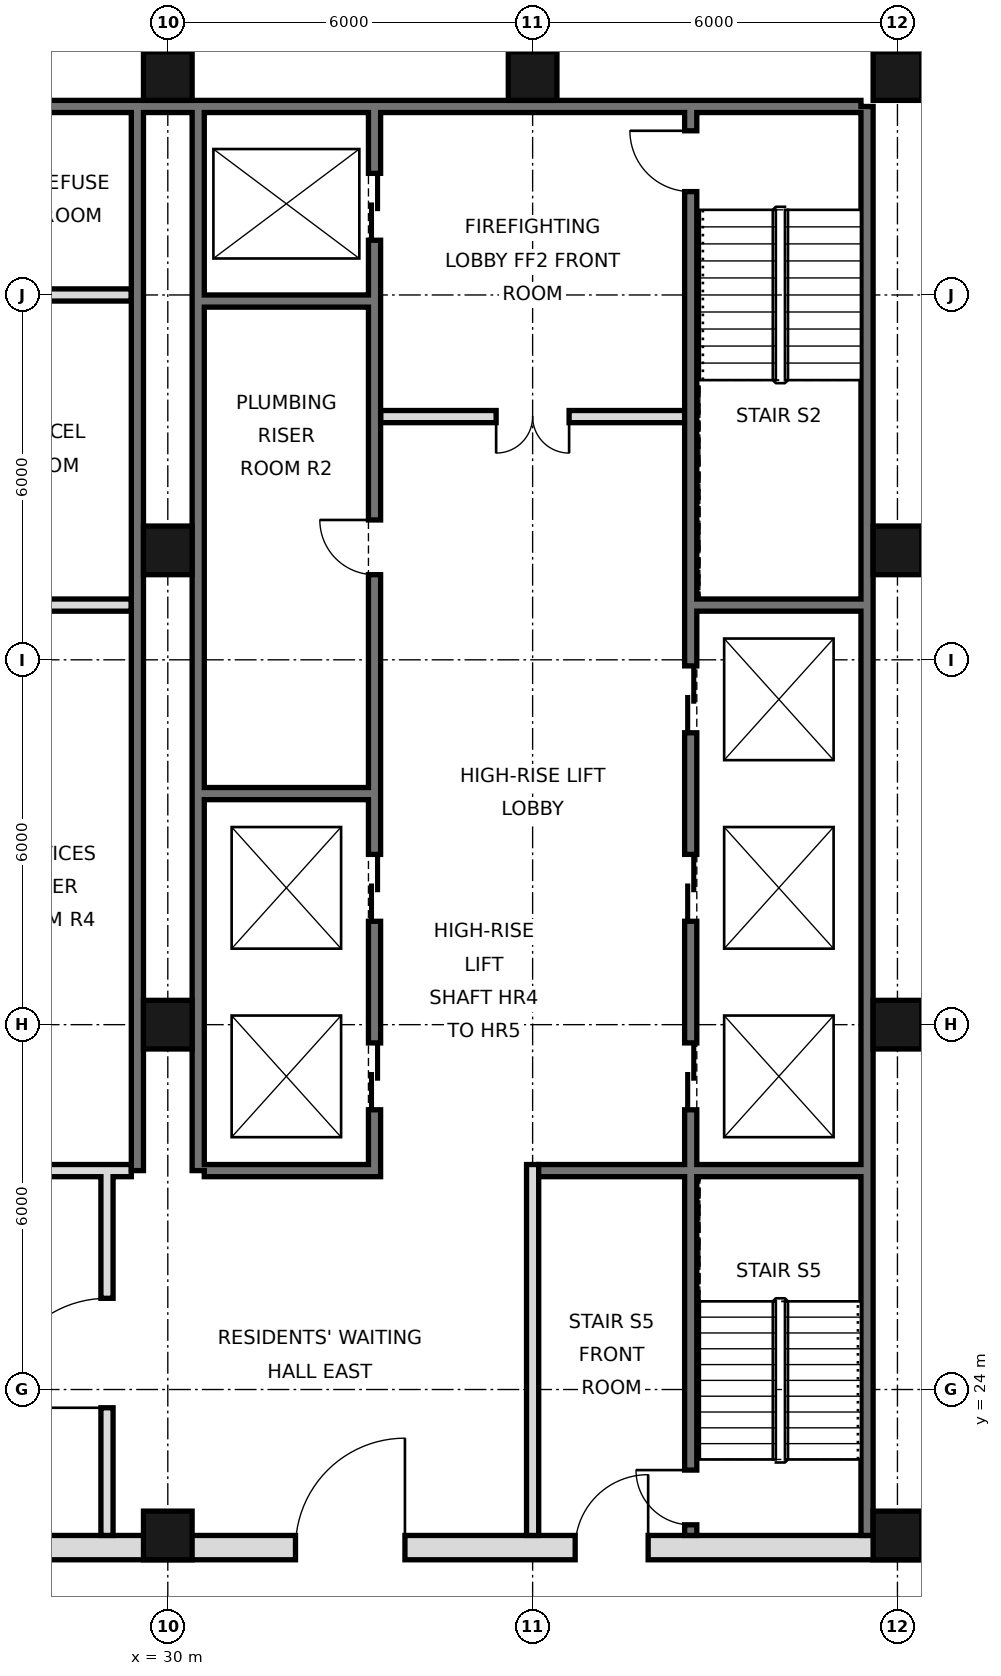
"""IFC4 building model, lengths in metres.
Left out: names, types, materials, properties, quantities, classifications, styles, units other than length and angle.
Written with IfcOpenShell. Run it as: python <this file> out.ifc"""

import sys

from ifc_helpers import new_model, si_unit, direction, frame, frame_2d, origin, origin_2d, place, context, subcontext, project, spatial, rectangle, hollow_rectangle, extrude, element, fill, save


model = new_model("IFC4")
c1 = context("Model", 3, precision=1e-05, world=origin(), true_north=direction((0.0, 1.0)))
c2 = subcontext(c1, "Body", "Model", "MODEL_VIEW")
j1 = project(units=[si_unit("LENGTHUNIT", "METRE"), si_unit("PLANEANGLEUNIT", "RADIAN")], contexts=[c1])
p1 = place(None, origin())
s1 = spatial("IfcSite", under=j1, at=p1, CompositionType="ELEMENT")
p2 = place(p1, origin())
s2 = spatial("IfcBuilding", under=s1, at=p2, CompositionType="ELEMENT")
p3 = place(p2, frame((0.0, 0.0, 305.2)))
s3 = spatial("IfcBuildingStorey", under=s2, at=p3, CompositionType="ELEMENT", Elevation=305.2)
for number, where, z_axis, x_axis in (
    (1, (30.0, 21.6, 0.0), (0.0, 0.0, 1.0), (1.0, 0.0, 0.0)),
    (2, (30.0, 30.0, 0.0), (0.0, 0.0, 1.0), (1.0, 0.0, 0.0)),
    (3, (30.0, 37.8, 0.0), (0.0, 0.0, 1.0), (1.0, 0.0, 0.0)),
    (4, (30.0, 45.6, 0.0), (0.0, 0.0, 1.0), (1.0, 0.0, 0.0)),
    (5, (36.0, 45.6, 0.0), (0.0, 0.0, 1.0), (1.0, 0.0, 0.0)),
    (6, (42.0, 21.6, 0.0), (0.0, 0.0, 1.0), (1.0, 0.0, 0.0)),
    (7, (42.0, 30.0, 0.0), (0.0, 0.0, 1.0), (1.0, 0.0, 0.0)),
    (8, (42.0, 37.8, 0.0), (0.0, 0.0, 1.0), (1.0, 0.0, 0.0)),
    (9, (42.0, 45.6, 0.0), (0.0, 0.0, 1.0), (1.0, 0.0, 0.0)),
):
    element("IfcColumn", number, at=place(p3, frame(where, z_axis=z_axis, x_axis=x_axis)), inside=s3, PredefinedType="COLUMN", context=c2, shape_type="SweptSolid", body=[
        extrude(hollow_rectangle(XDim=0.8, YDim=0.8, WallThickness=0.025, at=origin_2d()), origin(), (0.0, 0.0, 1.0), 3.6),
    ])
p4 = place(p3, frame((41.5, 21.6, 0.0), z_axis=(0.0, 0.0, 1.0), x_axis=(0.0, 1.0, 0.0)))
e10 = element("IfcWall", 10, at=p4, inside=s3, PredefinedType="SOLIDWALL", context=c2, shape_type="SweptSolid", body=[
    extrude(rectangle(XDim=23.5, YDim=0.2, at=frame_2d((11.75, 0.0))), origin(), (0.0, 0.0, 1.0), 3.42),
])
p5 = place(p3, frame((6.6, 45.1, 0.0), z_axis=(0.0, 0.0, 1.0), x_axis=(1.0, 0.0, 0.0)))
e11 = element("IfcWall", 11, at=p5, inside=s3, PredefinedType="SOLIDWALL", context=c2, shape_type="SweptSolid", body=[
    extrude(rectangle(XDim=34.8, YDim=0.2, at=frame_2d((17.4, 0.0))), origin(), (0.0, 0.0, 1.0), 3.42),
])
for number, where, z_axis, x_axis in (
    (12, (29.5, 27.6, 0.0), (0.0, 0.0, 1.0), (0.0, 1.0, 0.0)),
    (13, (30.5, 27.6, 0.0), (0.0, 0.0, 1.0), (0.0, 1.0, 0.0)),
):
    element("IfcWall", number, at=place(p3, frame(where, z_axis=z_axis, x_axis=x_axis)), inside=s3, PredefinedType="SOLIDWALL", context=c2, shape_type="SweptSolid", body=[
        extrude(rectangle(XDim=17.5, YDim=0.2, at=frame_2d((8.75, 0.0))), origin(), (0.0, 0.0, 1.0), 3.42),
    ])
p6 = place(p3, frame((5.6, 21.4, 0.0), z_axis=(0.0, 0.0, 1.0), x_axis=(1.0, 0.0, 0.0)))
e14 = element("IfcWall", 14, at=p6, inside=s3, PredefinedType="SOLIDWALL", context=c2, shape_type="SweptSolid", body=[
    extrude(rectangle(XDim=36.8, YDim=0.4, at=frame_2d((18.4, 0.0))), origin(), (0.0, 0.0, 1.0), 3.42),
])
p7 = place(p6, frame((8.5, 0.0, 0.0)))
e15 = element("IfcOpeningElement", 15, at=p7, cuts=e14, PredefinedType="OPENING", context=c2, shape_type="SweptSolid", body=[
    extrude(rectangle(XDim=1.8, YDim=2.1, at=frame_2d((0.9, 1.05))), frame((0.0, 0.21, 0.0), z_axis=(0.0, -1.0, 0.0), x_axis=(1.0, 0.0, 0.0)), (0.0, 0.0, 1.0), 0.42),
])
p8 = place(p6, frame((17.5, 0.0, 0.0)))
e16 = element("IfcOpeningElement", 16, at=p8, cuts=e14, PredefinedType="OPENING", context=c2, shape_type="SweptSolid", body=[
    extrude(rectangle(XDim=1.8, YDim=2.1, at=frame_2d((0.9, 1.05))), frame((0.0, 0.21, 0.0), z_axis=(0.0, -1.0, 0.0), x_axis=(1.0, 0.0, 0.0)), (0.0, 0.0, 1.0), 0.42),
])
p9 = place(p6, frame((26.5, 0.0, 0.0)))
e17 = element("IfcOpeningElement", 17, at=p9, cuts=e14, PredefinedType="OPENING", context=c2, shape_type="SweptSolid", body=[
    extrude(rectangle(XDim=1.8, YDim=2.1, at=frame_2d((0.9, 1.05))), frame((0.0, 0.21, 0.0), z_axis=(0.0, -1.0, 0.0), x_axis=(1.0, 0.0, 0.0)), (0.0, 0.0, 1.0), 0.42),
])
p10 = place(p6, frame((4.5, 0.0, 0.0)))
e18 = element("IfcOpeningElement", 18, at=p10, cuts=e14, PredefinedType="OPENING", context=c2, shape_type="SweptSolid", body=[
    extrude(rectangle(XDim=1.2, YDim=2.1, at=frame_2d((0.6, 1.05))), frame((0.0, 0.21, 0.0), z_axis=(0.0, -1.0, 0.0), x_axis=(1.0, 0.0, 0.0)), (0.0, 0.0, 1.0), 0.42),
])
p11 = place(p6, frame((31.1, 0.0, 0.0)))
e19 = element("IfcOpeningElement", 19, at=p11, cuts=e14, PredefinedType="OPENING", context=c2, shape_type="SweptSolid", body=[
    extrude(rectangle(XDim=1.2, YDim=2.1, at=frame_2d((0.6, 1.05))), frame((0.0, 0.21, 0.0), z_axis=(0.0, -1.0, 0.0), x_axis=(1.0, 0.0, 0.0)), (0.0, 0.0, 1.0), 0.42),
])
p12 = place(p3, frame((29.0, 21.6, 0.0), z_axis=(0.0, 0.0, 1.0), x_axis=(0.0, 1.0, 0.0)))
e20 = element("IfcWall", 20, at=p12, inside=s3, PredefinedType="PARTITIONING", context=c2, shape_type="SweptSolid", body=[
    extrude(rectangle(XDim=6.0, YDim=0.2, at=frame_2d((3.0, 0.0))), origin(), (0.0, 0.0, 1.0), 3.42),
])
p13 = place(p12, frame((2.1, 0.0, 0.0)))
e21 = element("IfcOpeningElement", 21, at=p13, cuts=e20, PredefinedType="OPENING", context=c2, shape_type="SweptSolid", body=[
    extrude(rectangle(XDim=1.8, YDim=2.1, at=frame_2d((0.9, 1.05))), frame((0.0, 0.11, 0.0), z_axis=(0.0, -1.0, 0.0), x_axis=(1.0, 0.0, 0.0)), (0.0, 0.0, 1.0), 0.22),
])
p14 = place(p3, frame((33.4, 27.5, 0.0), z_axis=(0.0, 0.0, 1.0), x_axis=(0.0, 1.0, 0.0)))
e22 = element("IfcWall", 22, at=p14, inside=s3, PredefinedType="SOLIDWALL", context=c2, shape_type="SweptSolid", body=[
    extrude(rectangle(XDim=17.5, YDim=0.2, at=frame_2d((8.75, 0.0))), origin(), (0.0, 0.0, 1.0), 3.42),
])
p15 = place(p14, frame((1.1, 0.0, 0.0)))
e23 = element("IfcOpeningElement", 23, at=p15, cuts=e22, PredefinedType="OPENING", context=c2, shape_type="SweptSolid", body=[
    extrude(rectangle(XDim=1.1, YDim=2.1, at=frame_2d((0.55, 1.05))), frame((0.0, 0.11, 0.0), z_axis=(0.0, -1.0, 0.0), x_axis=(1.0, 0.0, 0.0)), (0.0, 0.0, 1.0), 0.22),
])
p16 = place(p14, frame((4.2, 0.0, 0.0)))
e24 = element("IfcOpeningElement", 24, at=p16, cuts=e22, PredefinedType="OPENING", context=c2, shape_type="SweptSolid", body=[
    extrude(rectangle(XDim=1.1, YDim=2.1, at=frame_2d((0.55, 1.05))), frame((0.0, 0.11, 0.0), z_axis=(0.0, -1.0, 0.0), x_axis=(1.0, 0.0, 0.0)), (0.0, 0.0, 1.0), 0.22),
])
p17 = place(p14, frame((15.4, 0.0, 0.0)))
e25 = element("IfcOpeningElement", 25, at=p17, cuts=e22, PredefinedType="OPENING", context=c2, shape_type="SweptSolid", body=[
    extrude(rectangle(XDim=1.1, YDim=2.1, at=frame_2d((0.55, 1.05))), frame((0.0, 0.11, 0.0), z_axis=(0.0, -1.0, 0.0), x_axis=(1.0, 0.0, 0.0)), (0.0, 0.0, 1.0), 0.22),
])
p18 = place(p14, frame((9.9, 0.0, 0.0)))
e26 = element("IfcOpeningElement", 26, at=p18, cuts=e22, PredefinedType="OPENING", context=c2, shape_type="SweptSolid", body=[
    extrude(rectangle(XDim=0.9, YDim=2.1, at=frame_2d((0.45, 1.05))), frame((0.0, 0.11, 0.0), z_axis=(0.0, -1.0, 0.0), x_axis=(1.0, 0.0, 0.0)), (0.0, 0.0, 1.0), 0.22),
])
p19 = place(p3, frame((36.0, 21.6, 0.0), z_axis=(0.0, 0.0, 1.0), x_axis=(0.0, 1.0, 0.0)))
e27 = element("IfcWall", 27, at=p19, inside=s3, PredefinedType="PARTITIONING", context=c2, shape_type="SweptSolid", body=[
    extrude(rectangle(XDim=6.1, YDim=0.2, at=frame_2d((3.05, 0.0))), origin(), (0.0, 0.0, 1.0), 3.42),
])
p20 = place(p3, frame((38.6, 21.6, 0.0), z_axis=(0.0, 0.0, 1.0), x_axis=(0.0, 1.0, 0.0)))
e28 = element("IfcWall", 28, at=p20, inside=s3, PredefinedType="SOLIDWALL", context=c2, shape_type="SweptSolid", body=[
    extrude(rectangle(XDim=23.4, YDim=0.2, at=frame_2d((11.7, 0.0))), origin(), (0.0, 0.0, 1.0), 3.42),
])
p21 = place(p20, frame((7.0, 0.0, 0.0)))
e29 = element("IfcOpeningElement", 29, at=p21, cuts=e28, PredefinedType="OPENING", context=c2, shape_type="SweptSolid", body=[
    extrude(rectangle(XDim=1.1, YDim=2.1, at=frame_2d((0.55, 1.05))), frame((0.0, 0.11, 0.0), z_axis=(0.0, -1.0, 0.0), x_axis=(1.0, 0.0, 0.0)), (0.0, 0.0, 1.0), 0.22),
])
p22 = place(p20, frame((10.1, 0.0, 0.0)))
e30 = element("IfcOpeningElement", 30, at=p22, cuts=e28, PredefinedType="OPENING", context=c2, shape_type="SweptSolid", body=[
    extrude(rectangle(XDim=1.1, YDim=2.1, at=frame_2d((0.55, 1.05))), frame((0.0, 0.11, 0.0), z_axis=(0.0, -1.0, 0.0), x_axis=(1.0, 0.0, 0.0)), (0.0, 0.0, 1.0), 0.22),
])
p23 = place(p20, frame((13.2, 0.0, 0.0)))
e31 = element("IfcOpeningElement", 31, at=p23, cuts=e28, PredefinedType="OPENING", context=c2, shape_type="SweptSolid", body=[
    extrude(rectangle(XDim=1.1, YDim=2.1, at=frame_2d((0.55, 1.05))), frame((0.0, 0.11, 0.0), z_axis=(0.0, -1.0, 0.0), x_axis=(1.0, 0.0, 0.0)), (0.0, 0.0, 1.0), 0.22),
])
p24 = place(p20, frame((22.1, 0.0, 0.0)))
e32 = element("IfcOpeningElement", 32, at=p24, cuts=e28, PredefinedType="OPENING", context=c2, shape_type="SweptSolid", body=[
    extrude(rectangle(XDim=1.0, YDim=2.1, at=frame_2d((0.5, 1.05))), frame((0.0, 0.11, 0.0), z_axis=(0.0, -1.0, 0.0), x_axis=(1.0, 0.0, 0.0)), (0.0, 0.0, 1.0), 0.22),
])
p25 = place(p20, frame((0.175, 0.0, 0.0)))
e33 = element("IfcOpeningElement", 33, at=p25, cuts=e28, PredefinedType="OPENING", context=c2, shape_type="SweptSolid", body=[
    extrude(rectangle(XDim=0.9, YDim=2.1, at=frame_2d((0.45, 1.05))), frame((0.0, 0.11, 0.0), z_axis=(0.0, -1.0, 0.0), x_axis=(1.0, 0.0, 0.0)), (0.0, 0.0, 1.0), 0.22),
])
for number, where, z_axis, x_axis in (
    (34, (26.7, 27.6, 0.0), (0.0, 0.0, 1.0), (1.0, 0.0, 0.0)),
    (35, (30.6, 27.6, 0.0), (0.0, 0.0, 1.0), (1.0, 0.0, 0.0)),
):
    element("IfcWall", number, at=place(p3, frame(where, z_axis=z_axis, x_axis=x_axis)), inside=s3, PredefinedType="SOLIDWALL", context=c2, shape_type="SweptSolid", body=[
        extrude(rectangle(XDim=2.7, YDim=0.2, at=frame_2d((1.35, 0.0))), origin(), (0.0, 0.0, 1.0), 3.42),
    ])
p26 = place(p3, frame((36.1, 27.6, 0.0), z_axis=(0.0, 0.0, 1.0), x_axis=(1.0, 0.0, 0.0)))
e36 = element("IfcWall", 36, at=p26, inside=s3, PredefinedType="SOLIDWALL", context=c2, shape_type="SweptSolid", body=[
    extrude(rectangle(XDim=5.3, YDim=0.2, at=frame_2d((2.65, 0.0))), origin(), (0.0, 0.0, 1.0), 3.42),
])
for number, where, z_axis, x_axis in (
    (37, (30.6, 33.8, 0.0), (0.0, 0.0, 1.0), (1.0, 0.0, 0.0)),
    (38, (26.7, 36.9, 0.0), (0.0, 0.0, 1.0), (1.0, 0.0, 0.0)),
    (39, (38.7, 36.9, 0.0), (0.0, 0.0, 1.0), (1.0, 0.0, 0.0)),
):
    element("IfcWall", number, at=place(p3, frame(where, z_axis=z_axis, x_axis=x_axis)), inside=s3, PredefinedType="SOLIDWALL", context=c2, shape_type="SweptSolid", body=[
        extrude(rectangle(XDim=2.7, YDim=0.2, at=frame_2d((1.35, 0.0))), origin(), (0.0, 0.0, 1.0), 3.42),
    ])
p27 = place(p3, frame((33.5, 40.0, 0.0), z_axis=(0.0, 0.0, 1.0), x_axis=(1.0, 0.0, 0.0)))
e40 = element("IfcWall", 40, at=p27, inside=s3, PredefinedType="PARTITIONING", context=c2, shape_type="SweptSolid", body=[
    extrude(rectangle(XDim=5.0, YDim=0.2, at=frame_2d((2.5, 0.0))), origin(), (0.0, 0.0, 1.0), 3.42),
])
p28 = place(p27, frame((1.9, 0.0, 0.0)))
e41 = element("IfcOpeningElement", 41, at=p28, cuts=e40, PredefinedType="OPENING", context=c2, shape_type="SweptSolid", body=[
    extrude(rectangle(XDim=1.2, YDim=2.1, at=frame_2d((0.6, 1.05))), frame((0.0, 0.11, 0.0), z_axis=(0.0, -1.0, 0.0), x_axis=(1.0, 0.0, 0.0)), (0.0, 0.0, 1.0), 0.22),
])
p29 = place(p3, frame((30.6, 41.9, 0.0), z_axis=(0.0, 0.0, 1.0), x_axis=(1.0, 0.0, 0.0)))
e42 = element("IfcWall", 42, at=p29, inside=s3, PredefinedType="SOLIDWALL", context=c2, shape_type="SweptSolid", body=[
    extrude(rectangle(XDim=2.7, YDim=0.2, at=frame_2d((1.35, 0.0))), origin(), (0.0, 0.0, 1.0), 3.42),
])
p30 = place(p3, frame((26.7, 42.0, 0.0), z_axis=(0.0, 0.0, 1.0), x_axis=(1.0, 0.0, 0.0)))
e43 = element("IfcWall", 43, at=p30, inside=s3, PredefinedType="PARTITIONING", context=c2, shape_type="SweptSolid", body=[
    extrude(rectangle(XDim=2.7, YDim=0.2, at=frame_2d((1.35, 0.0))), origin(), (0.0, 0.0, 1.0), 3.42),
])
p31 = place(p13, origin())
e44 = element("IfcDoor", 44, at=p31, inside=s3, OperationType="SINGLE_SWING_LEFT", PredefinedType="DOOR", context=c2, shape_type="SweptSolid", body=[
    extrude(rectangle(XDim=1.8, YDim=2.1, at=frame_2d((0.9, 1.05))), frame((0.0, 0.025, 0.0), z_axis=(0.0, -1.0, 0.0), x_axis=(1.0, 0.0, 0.0)), (0.0, 0.0, 1.0), 0.05),
])
fill(e21, e44)
p32 = place(p9, frame((1.8, 0.0, 0.0), z_axis=(0.0, 0.0, 1.0), x_axis=(-1.0, 0.0, 0.0)))
e45 = element("IfcDoor", 45, at=p32, inside=s3, OperationType="SINGLE_SWING_LEFT", PredefinedType="DOOR", context=c2, shape_type="SweptSolid", body=[
    extrude(rectangle(XDim=1.8, YDim=2.1, at=frame_2d((0.9, 1.05))), frame((0.0, 0.025, 0.0), z_axis=(0.0, -1.0, 0.0), x_axis=(1.0, 0.0, 0.0)), (0.0, 0.0, 1.0), 0.05),
])
fill(e17, e45)
p33 = place(p11, frame((1.2, 0.0, 0.0), z_axis=(0.0, 0.0, 1.0), x_axis=(-1.0, 0.0, 0.0)))
e46 = element("IfcDoor", 46, at=p33, inside=s3, OperationType="SINGLE_SWING_LEFT", PredefinedType="DOOR", context=c2, shape_type="SweptSolid", body=[
    extrude(rectangle(XDim=1.2, YDim=2.1, at=frame_2d((0.6, 1.05))), frame((0.0, 0.025, 0.0), z_axis=(0.0, -1.0, 0.0), x_axis=(1.0, 0.0, 0.0)), (0.0, 0.0, 1.0), 0.05),
])
fill(e19, e46)
p34 = place(p28, frame((1.2, 0.0, 0.0), z_axis=(0.0, 0.0, 1.0), x_axis=(-1.0, 0.0, 0.0)))
e47 = element("IfcDoor", 47, at=p34, inside=s3, OperationType="DOUBLE_DOOR_SINGLE_SWING", PredefinedType="DOOR", context=c2, shape_type="SweptSolid", body=[
    extrude(rectangle(XDim=1.2, YDim=2.1, at=frame_2d((0.6, 1.05))), frame((0.0, 0.025, 0.0), z_axis=(0.0, -1.0, 0.0), x_axis=(1.0, 0.0, 0.0)), (0.0, 0.0, 1.0), 0.05),
])
fill(e41, e47)
p35 = place(p21, origin())
e48 = element("IfcDoor", 48, at=p35, inside=s3, OperationType="DOUBLE_DOOR_SLIDING", PredefinedType="DOOR", context=c2, shape_type="SweptSolid", body=[
    extrude(rectangle(XDim=1.1, YDim=2.1, at=frame_2d((0.55, 1.05))), frame((0.0, 0.025, 0.0), z_axis=(0.0, -1.0, 0.0), x_axis=(1.0, 0.0, 0.0)), (0.0, 0.0, 1.0), 0.05),
])
fill(e29, e48)
p36 = place(p22, origin())
e49 = element("IfcDoor", 49, at=p36, inside=s3, OperationType="DOUBLE_DOOR_SLIDING", PredefinedType="DOOR", context=c2, shape_type="SweptSolid", body=[
    extrude(rectangle(XDim=1.1, YDim=2.1, at=frame_2d((0.55, 1.05))), frame((0.0, 0.025, 0.0), z_axis=(0.0, -1.0, 0.0), x_axis=(1.0, 0.0, 0.0)), (0.0, 0.0, 1.0), 0.05),
])
fill(e30, e49)
p37 = place(p23, origin())
e50 = element("IfcDoor", 50, at=p37, inside=s3, OperationType="DOUBLE_DOOR_SLIDING", PredefinedType="DOOR", context=c2, shape_type="SweptSolid", body=[
    extrude(rectangle(XDim=1.1, YDim=2.1, at=frame_2d((0.55, 1.05))), frame((0.0, 0.025, 0.0), z_axis=(0.0, -1.0, 0.0), x_axis=(1.0, 0.0, 0.0)), (0.0, 0.0, 1.0), 0.05),
])
fill(e31, e50)
p38 = place(p15, origin())
e51 = element("IfcDoor", 51, at=p38, inside=s3, OperationType="DOUBLE_DOOR_SLIDING", PredefinedType="DOOR", context=c2, shape_type="SweptSolid", body=[
    extrude(rectangle(XDim=1.1, YDim=2.1, at=frame_2d((0.55, 1.05))), frame((0.0, 0.025, 0.0), z_axis=(0.0, -1.0, 0.0), x_axis=(1.0, 0.0, 0.0)), (0.0, 0.0, 1.0), 0.05),
])
fill(e23, e51)
p39 = place(p16, origin())
e52 = element("IfcDoor", 52, at=p39, inside=s3, OperationType="DOUBLE_DOOR_SLIDING", PredefinedType="DOOR", context=c2, shape_type="SweptSolid", body=[
    extrude(rectangle(XDim=1.1, YDim=2.1, at=frame_2d((0.55, 1.05))), frame((0.0, 0.025, 0.0), z_axis=(0.0, -1.0, 0.0), x_axis=(1.0, 0.0, 0.0)), (0.0, 0.0, 1.0), 0.05),
])
fill(e24, e52)
p40 = place(p17, origin())
e53 = element("IfcDoor", 53, at=p40, inside=s3, OperationType="DOUBLE_DOOR_SLIDING", PredefinedType="DOOR", context=c2, shape_type="SweptSolid", body=[
    extrude(rectangle(XDim=1.1, YDim=2.1, at=frame_2d((0.55, 1.05))), frame((0.0, 0.025, 0.0), z_axis=(0.0, -1.0, 0.0), x_axis=(1.0, 0.0, 0.0)), (0.0, 0.0, 1.0), 0.05),
])
fill(e25, e53)
p41 = place(p24, frame((1.0, 0.0, 0.0), z_axis=(0.0, 0.0, 1.0), x_axis=(-1.0, 0.0, 0.0)))
e54 = element("IfcDoor", 54, at=p41, inside=s3, OperationType="SINGLE_SWING_LEFT", PredefinedType="DOOR", context=c2, shape_type="SweptSolid", body=[
    extrude(rectangle(XDim=1.0, YDim=2.1, at=frame_2d((0.5, 1.05))), frame((0.0, 0.025, 0.0), z_axis=(0.0, -1.0, 0.0), x_axis=(1.0, 0.0, 0.0)), (0.0, 0.0, 1.0), 0.05),
])
fill(e32, e54)
p42 = place(p25, frame((0.9, 0.0, 0.0), z_axis=(0.0, 0.0, 1.0), x_axis=(-1.0, 0.0, 0.0)))
e55 = element("IfcDoor", 55, at=p42, inside=s3, OperationType="SINGLE_SWING_LEFT", PredefinedType="DOOR", context=c2, shape_type="SweptSolid", body=[
    extrude(rectangle(XDim=0.9, YDim=2.1, at=frame_2d((0.45, 1.05))), frame((0.0, 0.025, 0.0), z_axis=(0.0, -1.0, 0.0), x_axis=(1.0, 0.0, 0.0)), (0.0, 0.0, 1.0), 0.05),
])
fill(e33, e55)
p43 = place(p18, frame((0.9, 0.0, 0.0), z_axis=(0.0, 0.0, 1.0), x_axis=(-1.0, 0.0, 0.0)))
e56 = element("IfcDoor", 56, at=p43, inside=s3, OperationType="SINGLE_SWING_LEFT", PredefinedType="DOOR", context=c2, shape_type="SweptSolid", body=[
    extrude(rectangle(XDim=0.9, YDim=2.1, at=frame_2d((0.45, 1.05))), frame((0.0, 0.025, 0.0), z_axis=(0.0, -1.0, 0.0), x_axis=(1.0, 0.0, 0.0)), (0.0, 0.0, 1.0), 0.05),
])
fill(e26, e56)
save(model, sys.argv[1])
